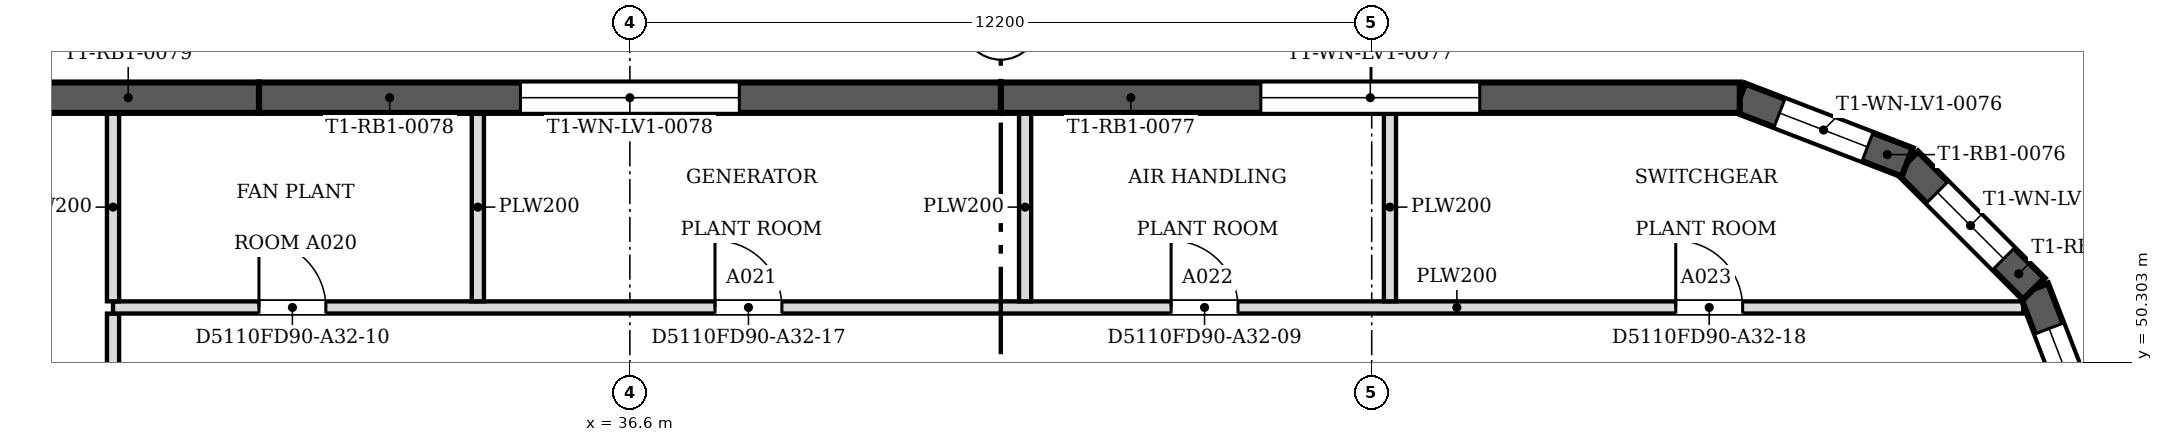
"""IFC4 building model, lengths in metres.
Left out: names, types, materials, properties, quantities, classifications, styles, units other than length and angle.
Written with IfcOpenShell. Run it as: python <this file> out.ifc"""

import sys

from ifc_helpers import new_model, si_unit, direction, frame, frame_2d, origin, place, context, subcontext, project, spatial, polyline, rectangle, outline, extrude, faceted_brep, source, transform, mapped, element, fill, save


model = new_model("IFC4")
c1 = context("Model", 3, precision=1e-05, world=origin(), true_north=direction((0.0, 1.0)))
c2 = subcontext(c1, "Body", "Model", "MODEL_VIEW")
j1 = project(units=[si_unit("LENGTHUNIT", "METRE"), si_unit("PLANEANGLEUNIT", "RADIAN")], contexts=[c1])
p1 = place(None, origin())
s1 = spatial("IfcSite", under=j1, at=p1, CompositionType="ELEMENT")
p2 = place(p1, origin())
s2 = spatial("IfcBuilding", under=s1, at=p2, CompositionType="ELEMENT")
p3 = place(p2, frame((0.0, 0.0, 232.1)))
s3 = spatial("IfcBuildingStorey", under=s2, at=p3, CompositionType="ELEMENT", Elevation=232.1)
m1 = source(origin(), c2, "Body", "Brep", [
    faceted_brep([(0.0, -0.25, 0.0), (2.95, -0.25, 0.0), (2.95, -0.25, 4.8), (0.0, -0.25, 4.8), (0.047, 0.25, 4.8), (2.898, 0.25, 4.8), (2.898, 0.25, 0.0), (0.047, 0.25, 0.0), (2.95, 0.0, 0.0), (0.0, 0.0, 0.0), (2.95, 0.0, 4.8), (0.0, 0.0, 4.8)], [[[0, 1, 2, 3]], [[4, 5, 6, 7]], [[7, 6, 8, 1, 0, 9]], [[10, 2, 1, 8]], [[5, 4, 11, 3, 2, 10]], [[9, 0, 3, 11]], [[7, 9, 11, 4]], [[8, 6, 5, 10]]]),
])
p4 = place(p3, frame((60.75, 48.753, 0.0), z_axis=(0.0, 0.0, 1.0), x_axis=(-0.359877213415, 0.932999673775, 0.0)))
e1 = element("IfcWall", 1, at=p4, inside=s3, PredefinedType="SOLIDWALL", context=c2, shape_type="MappedRepresentation", body=[
    mapped(m1, transform((0.0, 0.0, 0.0), scale=1.0)),
])
m2 = source(origin(), c2, "Body", "SweptSolid", [
    extrude(outline(polyline([(0.7, 0.8), (2.25, 0.8), (2.25, 4.0), (0.7, 4.0), (0.7, 0.8)])), frame((0.0, 0.26, 0.0), z_axis=(0.0, -1.0, 0.0), x_axis=(1.0, 0.0, 0.0)), (0.0, 0.0, 1.0), 0.52),
])
p5 = place(p4, origin())
e2 = element("IfcOpeningElement", 2, at=p5, cuts=e1, PredefinedType="OPENING", context=c2, shape_type="MappedRepresentation", body=[
    mapped(m2, transform((0.0, 0.0, 0.0), scale=1.0)),
])
m3 = source(origin(), c2, "Body", "Brep", [
    faceted_brep([(0.0, -0.25, 0.0), (2.944, -0.25, 0.0), (2.944, -0.25, 4.8), (0.0, -0.25, 4.8), (0.053, 0.25, 4.8), (2.891, 0.25, 4.8), (2.891, 0.25, 0.0), (0.053, 0.25, 0.0), (2.944, 0.0, 0.0), (0.0, 0.0, 0.0), (2.944, 0.0, 4.8), (0.0, 0.0, 4.8)], [[[0, 1, 2, 3]], [[4, 5, 6, 7]], [[7, 6, 8, 1, 0, 9]], [[10, 2, 1, 8]], [[5, 4, 11, 3, 2, 10]], [[9, 0, 3, 11]], [[7, 9, 11, 4]], [[8, 6, 5, 10]]]),
])
p6 = place(p3, frame((59.688, 51.506, 0.0), z_axis=(0.0, 0.0, 1.0), x_axis=(-0.707106781187, 0.707106781187, 0.0)))
e3 = element("IfcWall", 3, at=p6, inside=s3, PredefinedType="SOLIDWALL", context=c2, shape_type="MappedRepresentation", body=[
    mapped(m3, transform((0.0, 0.0, 0.0), scale=1.0)),
])
m4 = source(origin(), c2, "Body", "SweptSolid", [
    extrude(outline(polyline([(0.7, 0.8), (2.244, 0.8), (2.244, 4.0), (0.7, 4.0), (0.7, 0.8)])), frame((0.0, 0.26, 0.0), z_axis=(0.0, -1.0, 0.0), x_axis=(1.0, 0.0, 0.0)), (0.0, 0.0, 1.0), 0.52),
])
p7 = place(p6, origin())
e4 = element("IfcOpeningElement", 4, at=p7, cuts=e3, PredefinedType="OPENING", context=c2, shape_type="MappedRepresentation", body=[
    mapped(m4, transform((0.0, 0.0, 0.0), scale=1.0)),
])
m5 = source(origin(), c2, "Body", "Brep", [
    faceted_brep([(0.0, -0.25, 0.0), (2.95, -0.25, 0.0), (2.95, -0.25, 4.8), (0.0, -0.25, 4.8), (0.053, 0.25, 4.8), (2.904, 0.25, 4.8), (2.904, 0.25, 0.0), (0.053, 0.25, 0.0), (2.95, 0.0, 0.0), (0.0, 0.0, 0.0), (2.95, 0.0, 4.8), (0.0, 0.0, 4.8)], [[[0, 1, 2, 3]], [[4, 5, 6, 7]], [[7, 6, 8, 1, 0, 9]], [[10, 2, 1, 8]], [[5, 4, 11, 3, 2, 10]], [[9, 0, 3, 11]], [[7, 9, 11, 4]], [[8, 6, 5, 10]]]),
])
p8 = place(p3, frame((57.606, 53.588, 0.0), z_axis=(0.0, 0.0, 1.0), x_axis=(-0.932999673775, 0.359877213415, 0.0)))
e5 = element("IfcWall", 5, at=p8, inside=s3, PredefinedType="SOLIDWALL", context=c2, shape_type="MappedRepresentation", body=[
    mapped(m5, transform((0.0, 0.0, 0.0), scale=1.0)),
])
p9 = place(p8, origin())
e6 = element("IfcOpeningElement", 6, at=p9, cuts=e5, PredefinedType="OPENING", context=c2, shape_type="MappedRepresentation", body=[
    mapped(m2, transform((0.0, 0.0, 0.0), scale=1.0)),
])
m6 = source(origin(), c2, "Body", "Brep", [
    faceted_brep([(0.0, -0.25, 0.0), (12.154, -0.25, 0.0), (12.154, -0.25, 4.8), (0.0, -0.25, 4.8), (0.047, 0.25, 4.8), (12.154, 0.25, 4.8), (12.154, 0.25, 0.0), (0.047, 0.25, 0.0), (0.0, 0.0, 0.0), (0.0, 0.0, 4.8)], [[[0, 1, 2, 3]], [[4, 5, 6, 7]], [[7, 6, 1, 0, 8]], [[5, 4, 9, 3, 2]], [[8, 0, 3, 9]], [[7, 8, 9, 4]], [[1, 6, 5, 2]]]),
])
p10 = place(p3, frame((54.854, 54.65, 0.0), z_axis=(0.0, 0.0, 1.0), x_axis=(-1.0, 0.0, 0.0)))
e7 = element("IfcWall", 7, at=p10, inside=s3, PredefinedType="SOLIDWALL", context=c2, shape_type="MappedRepresentation", body=[
    mapped(m6, transform((0.0, 0.0, 0.0), scale=1.0)),
])
m7 = source(origin(), c2, "Body", "SweptSolid", [
    extrude(outline(polyline([(4.277, 0.8), (7.877, 0.8), (7.877, 4.0), (4.277, 4.0), (4.277, 0.8)])), frame((0.0, 0.26, 0.0), z_axis=(0.0, -1.0, 0.0), x_axis=(1.0, 0.0, 0.0)), (0.0, 0.0, 1.0), 0.52),
])
p11 = place(p10, origin())
e8 = element("IfcOpeningElement", 8, at=p11, cuts=e7, PredefinedType="OPENING", context=c2, shape_type="MappedRepresentation", body=[
    mapped(m7, transform((0.0, 0.0, 0.0), scale=1.0)),
])
m8 = source(origin(), c2, "Body", "SweptSolid", [
    extrude(outline(polyline([(0.0, 0.0), (12.2, 0.0), (12.2, 4.8), (0.0, 4.8), (0.0, 0.0)])), frame((0.0, 0.25, 0.0), z_axis=(0.0, -1.0, 0.0), x_axis=(1.0, 0.0, 0.0)), (0.0, 0.0, 1.0), 0.5),
])
p12 = place(p3, frame((42.7, 54.65, 0.0), z_axis=(0.0, 0.0, 1.0), x_axis=(-1.0, 0.0, 0.0)))
e9 = element("IfcWall", 9, at=p12, inside=s3, PredefinedType="SOLIDWALL", context=c2, shape_type="MappedRepresentation", body=[
    mapped(m8, transform((0.0, 0.0, 0.0), scale=1.0)),
])
m9 = source(origin(), c2, "Body", "SweptSolid", [
    extrude(outline(polyline([(4.3, 0.8), (7.9, 0.8), (7.9, 4.0), (4.3, 4.0), (4.3, 0.8)])), frame((0.0, 0.26, 0.0), z_axis=(0.0, -1.0, 0.0), x_axis=(1.0, 0.0, 0.0)), (0.0, 0.0, 1.0), 0.52),
])
p13 = place(p12, origin())
e10 = element("IfcOpeningElement", 10, at=p13, cuts=e9, PredefinedType="OPENING", context=c2, shape_type="MappedRepresentation", body=[
    mapped(m9, transform((0.0, 0.0, 0.0), scale=1.0)),
])
p14 = place(p3, frame((30.5, 54.65, 0.0), z_axis=(0.0, 0.0, 1.0), x_axis=(-1.0, 0.0, 0.0)))
e11 = element("IfcWall", 11, at=p14, inside=s3, PredefinedType="SOLIDWALL", context=c2, shape_type="MappedRepresentation", body=[
    mapped(m8, transform((0.0, 0.0, 0.0), scale=1.0)),
])
p15 = place(p14, origin())
e12 = element("IfcOpeningElement", 12, at=p15, cuts=e11, PredefinedType="OPENING", context=c2, shape_type="MappedRepresentation", body=[
    mapped(m9, transform((0.0, 0.0, 0.0), scale=1.0)),
])
p16 = place(p3, frame((28.1, 48.101, 0.0), z_axis=(0.0, 0.0, 1.0), x_axis=(0.0, 1.0, 0.0)))
e13 = element("IfcWall", 13, at=p16, inside=s3, PredefinedType="PARTITIONING", context=c2, shape_type="SweptSolid", body=[
    extrude(rectangle(XDim=2.998, YDim=0.2, at=frame_2d((1.499, 0.0))), origin(), (0.0, 0.0, 1.0), 3.817),
])
p17 = place(p3, frame((28.1, 51.2, 0.0), z_axis=(0.0, 0.0, 1.0), x_axis=(1.0, 0.0, 0.0)))
e14 = element("IfcWall", 14, at=p17, inside=s3, PredefinedType="PARTITIONING", context=c2, shape_type="SweptSolid", body=[
    extrude(rectangle(XDim=31.413, YDim=0.2, at=frame_2d((15.707, 0.0))), origin(), (0.0, 0.0, 1.0), 3.817),
])
m10 = source(origin(), c2, "Body", "SweptSolid", [
    extrude(rectangle(XDim=1.1, YDim=2.1, at=frame_2d((0.55, 1.05))), frame((0.0, 0.11, 0.0), z_axis=(0.0, -1.0, 0.0), x_axis=(1.0, 0.0, 0.0)), (0.0, 0.0, 1.0), 0.22),
])
p18 = place(p17, frame((17.401, 0.0, 0.0)))
e15 = element("IfcOpeningElement", 15, at=p18, cuts=e14, PredefinedType="OPENING", context=c2, shape_type="MappedRepresentation", body=[
    mapped(m10, transform((0.0, 0.0, 0.0), scale=1.0)),
])
p19 = place(p17, frame((2.4, 0.0, 0.0)))
e16 = element("IfcOpeningElement", 16, at=p19, cuts=e14, PredefinedType="OPENING", context=c2, shape_type="MappedRepresentation", body=[
    mapped(m10, transform((0.0, 0.0, 0.0), scale=1.0)),
])
p20 = place(p17, frame((9.9, 0.0, 0.0)))
e17 = element("IfcOpeningElement", 17, at=p20, cuts=e14, PredefinedType="OPENING", context=c2, shape_type="MappedRepresentation", body=[
    mapped(m10, transform((0.0, 0.0, 0.0), scale=1.0)),
])
p21 = place(p17, frame((25.7, 0.0, 0.0)))
e18 = element("IfcOpeningElement", 18, at=p21, cuts=e14, PredefinedType="OPENING", context=c2, shape_type="MappedRepresentation", body=[
    mapped(m10, transform((0.0, 0.0, 0.0), scale=1.0)),
])
for number, where, z_axis, x_axis in (
    (19, (28.1, 51.301, 0.0), (0.0, 0.0, 1.0), (0.0, 1.0, 0.0)),
    (20, (34.1, 51.301, 0.0), (0.0, 0.0, 1.0), (0.0, 1.0, 0.0)),
    (21, (43.1, 51.301, 0.0), (0.0, 0.0, 1.0), (0.0, 1.0, 0.0)),
    (22, (49.1, 51.301, 0.0), (0.0, 0.0, 1.0), (0.0, 1.0, 0.0)),
):
    element("IfcWall", number, at=place(p3, frame(where, z_axis=z_axis, x_axis=x_axis)), inside=s3, PredefinedType="PARTITIONING", context=c2, shape_type="SweptSolid", body=[
        extrude(rectangle(XDim=3.099, YDim=0.2, at=frame_2d((1.549, 0.0))), origin(), (0.0, 0.0, 1.0), 3.817),
    ])
m11 = source(origin(), c2, "Body", "SweptSolid", [
    extrude(outline(polyline([(0.7, 0.8), (2.25, 0.8), (2.25, 4.0), (0.7, 4.0), (0.7, 0.8)])), frame((0.0, 0.03, 0.0), z_axis=(0.0, -1.0, 0.0), x_axis=(1.0, 0.0, 0.0)), (0.0, 0.0, 1.0), 0.06),
])
p22 = place(p5, origin())
e23 = element("IfcWindow", 23, at=p22, inside=s3, PartitioningType="USERDEFINED", PredefinedType="WINDOW", context=c2, shape_type="MappedRepresentation", body=[
    mapped(m11, transform((0.0, 0.0, 0.0), scale=1.0)),
])
fill(e2, e23)
m12 = source(origin(), c2, "Body", "SweptSolid", [
    extrude(outline(polyline([(0.7, 0.8), (2.244, 0.8), (2.244, 4.0), (0.7, 4.0), (0.7, 0.8)])), frame((0.0, 0.03, 0.0), z_axis=(0.0, -1.0, 0.0), x_axis=(1.0, 0.0, 0.0)), (0.0, 0.0, 1.0), 0.06),
])
p23 = place(p7, origin())
e24 = element("IfcWindow", 24, at=p23, inside=s3, PartitioningType="USERDEFINED", PredefinedType="WINDOW", context=c2, shape_type="MappedRepresentation", body=[
    mapped(m12, transform((0.0, 0.0, 0.0), scale=1.0)),
])
fill(e4, e24)
p24 = place(p9, origin())
e25 = element("IfcWindow", 25, at=p24, inside=s3, PartitioningType="USERDEFINED", PredefinedType="WINDOW", context=c2, shape_type="MappedRepresentation", body=[
    mapped(m11, transform((0.0, 0.0, 0.0), scale=1.0)),
])
fill(e6, e25)
m13 = source(origin(), c2, "Body", "SweptSolid", [
    extrude(outline(polyline([(4.277, 0.8), (7.877, 0.8), (7.877, 4.0), (4.277, 4.0), (4.277, 0.8)])), frame((0.0, 0.03, 0.0), z_axis=(0.0, -1.0, 0.0), x_axis=(1.0, 0.0, 0.0)), (0.0, 0.0, 1.0), 0.06),
])
p25 = place(p11, origin())
e26 = element("IfcWindow", 26, at=p25, inside=s3, PartitioningType="USERDEFINED", PredefinedType="WINDOW", context=c2, shape_type="MappedRepresentation", body=[
    mapped(m13, transform((0.0, 0.0, 0.0), scale=1.0)),
])
fill(e8, e26)
m14 = source(origin(), c2, "Body", "SweptSolid", [
    extrude(outline(polyline([(4.3, 0.8), (7.9, 0.8), (7.9, 4.0), (4.3, 4.0), (4.3, 0.8)])), frame((0.0, 0.03, 0.0), z_axis=(0.0, -1.0, 0.0), x_axis=(1.0, 0.0, 0.0)), (0.0, 0.0, 1.0), 0.06),
])
p26 = place(p13, origin())
e27 = element("IfcWindow", 27, at=p26, inside=s3, PartitioningType="USERDEFINED", PredefinedType="WINDOW", context=c2, shape_type="MappedRepresentation", body=[
    mapped(m14, transform((0.0, 0.0, 0.0), scale=1.0)),
])
fill(e10, e27)
m15 = source(origin(), c2, "Body", "SweptSolid", [
    extrude(rectangle(XDim=1.1, YDim=2.1, at=frame_2d((0.55, 1.05))), frame((0.0, 0.025, 0.0), z_axis=(0.0, -1.0, 0.0), x_axis=(1.0, 0.0, 0.0)), (0.0, 0.0, 1.0), 0.05),
])
p27 = place(p18, origin())
e28 = element("IfcDoor", 28, at=p27, inside=s3, OperationType="SINGLE_SWING_LEFT", PredefinedType="DOOR", context=c2, shape_type="MappedRepresentation", body=[
    mapped(m15, transform((0.0, 0.0, 0.0), scale=1.0)),
])
fill(e15, e28)
p28 = place(p19, origin())
e29 = element("IfcDoor", 29, at=p28, inside=s3, OperationType="SINGLE_SWING_LEFT", PredefinedType="DOOR", context=c2, shape_type="MappedRepresentation", body=[
    mapped(m15, transform((0.0, 0.0, 0.0), scale=1.0)),
])
fill(e16, e29)
p29 = place(p20, origin())
e30 = element("IfcDoor", 30, at=p29, inside=s3, OperationType="SINGLE_SWING_LEFT", PredefinedType="DOOR", context=c2, shape_type="MappedRepresentation", body=[
    mapped(m15, transform((0.0, 0.0, 0.0), scale=1.0)),
])
fill(e17, e30)
p30 = place(p21, origin())
e31 = element("IfcDoor", 31, at=p30, inside=s3, OperationType="SINGLE_SWING_LEFT", PredefinedType="DOOR", context=c2, shape_type="MappedRepresentation", body=[
    mapped(m15, transform((0.0, 0.0, 0.0), scale=1.0)),
])
fill(e18, e31)
save(model, sys.argv[1])
